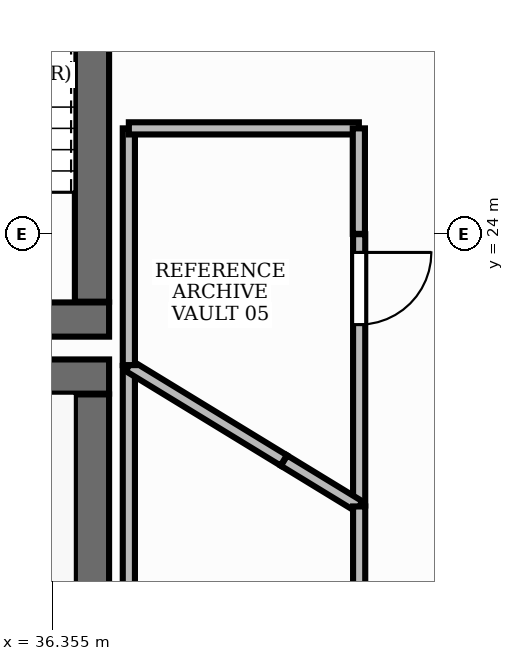
"""IFC4 building model, lengths in metres.
Left out: names, types, materials, properties, quantities, classifications, styles, units other than length and angle.
Written with IfcOpenShell. Run it as: python <this file> out.ifc"""

import sys

from ifc_helpers import new_model, si_unit, direction, frame, frame_2d, origin, place, context, subcontext, project, spatial, rectangle, extrude, element, fill, save


model = new_model("IFC4")
c1 = context("Model", 3, precision=1e-05, world=origin(), true_north=direction((0.0, 1.0)))
c2 = subcontext(c1, "Body", "Model", "MODEL_VIEW")
j1 = project(units=[si_unit("LENGTHUNIT", "METRE"), si_unit("PLANEANGLEUNIT", "RADIAN")], contexts=[c1])
p1 = place(None, origin())
s1 = spatial("IfcSite", under=j1, at=p1, CompositionType="ELEMENT")
p2 = place(p1, origin())
s2 = spatial("IfcBuilding", under=s1, at=p2, CompositionType="ELEMENT")
p3 = place(p2, frame((0.0, 0.0, 94.2)))
s3 = spatial("IfcBuildingStorey", under=s2, at=p3, CompositionType="ELEMENT", Elevation=94.2)
p4 = place(p3, frame((28.35, 22.125, 0.0), z_axis=(0.0, 0.0, 1.0), x_axis=(1.0, 0.0, 0.0)))
e1 = element("IfcWall", 1, at=p4, inside=s3, PredefinedType="SHEAR", context=c2, shape_type="SweptSolid", body=[
    extrude(rectangle(XDim=8.75, YDim=0.45, at=frame_2d((4.375, 0.0))), origin(), (0.0, 0.0, 1.0), 3.9),
])
p5 = place(p3, frame((36.875, 18.81, 0.0), z_axis=(0.0, 0.0, 1.0), x_axis=(0.0, 1.0, 0.0)))
e2 = element("IfcWall", 2, at=p5, inside=s3, PredefinedType="SHEAR", context=c2, shape_type="SweptSolid", body=[
    extrude(rectangle(XDim=3.08, YDim=0.45, at=frame_2d((1.54, 0.0))), origin(), (0.0, 0.0, 1.0), 3.9),
])
p6 = place(p3, frame((33.1, 22.875, 0.0), z_axis=(0.0, 0.0, 1.0), x_axis=(1.0, 0.0, 0.0)))
e3 = element("IfcWall", 3, at=p6, inside=s3, PredefinedType="SHEAR", context=c2, shape_type="SweptSolid", body=[
    extrude(rectangle(XDim=4.0, YDim=0.45, at=frame_2d((2.0, 0.0))), origin(), (0.0, 0.0, 1.0), 3.9),
])
p7 = place(p3, frame((36.875, 23.11, 0.0), z_axis=(0.0, 0.0, 1.0), x_axis=(0.0, 1.0, 0.0)))
e4 = element("IfcWall", 4, at=p7, inside=s3, PredefinedType="SHEAR", context=c2, shape_type="SweptSolid", body=[
    extrude(rectangle(XDim=7.78, YDim=0.45, at=frame_2d((3.89, 0.0))), origin(), (0.0, 0.0, 1.0), 3.9),
])
p8 = place(p3, frame((40.39, 23.998, 0.0), z_axis=(0.0, 0.0, 1.0), x_axis=(0.0, -1.0, 0.0)))
e5 = element("IfcWall", 5, at=p8, inside=s3, PredefinedType="PARTITIONING", context=c2, shape_type="SweptSolid", body=[
    extrude(rectangle(XDim=3.57, YDim=0.16, at=frame_2d((1.785, 0.0))), origin(), (0.0, 0.0, 1.0), 2.91),
])
p9 = place(p8, frame((0.24, 0.0, 0.0)))
e6 = element("IfcOpeningElement", 6, at=p9, cuts=e5, PredefinedType="OPENING", context=c2, shape_type="SweptSolid", body=[
    extrude(rectangle(XDim=0.95, YDim=2.15, at=frame_2d((0.475, 1.075))), frame((0.0, 0.095, 0.0), z_axis=(0.0, -1.0, 0.0), x_axis=(1.0, 0.0, 0.0)), (0.0, 0.0, 1.0), 0.19),
])
p10 = place(p3, frame((39.402, 21.019, 0.0), z_axis=(0.0, 0.0, 1.0), x_axis=(0.853521615148, -0.52105743683, 0.0)))
e7 = element("IfcWall", 7, at=p10, inside=s3, PredefinedType="PARTITIONING", context=c2, shape_type="SweptSolid", body=[
    extrude(rectangle(XDim=1.157, YDim=0.16, at=frame_2d((0.579, 0.0))), origin(), (0.0, 0.0, 1.0), 2.91),
])
p11 = place(p3, frame((40.39, 20.416, 0.0), z_axis=(0.0, 0.0, 1.0), x_axis=(0.0, -1.0, 0.0)))
e8 = element("IfcWall", 8, at=p11, inside=s3, PredefinedType="PARTITIONING", context=c2, shape_type="SweptSolid", body=[
    extrude(rectangle(XDim=3.916, YDim=0.16, at=frame_2d((1.958, 0.0))), origin(), (0.0, 0.0, 1.0), 2.91),
])
p12 = place(p3, frame((37.36, 18.1, 0.0), z_axis=(0.0, 0.0, 1.0), x_axis=(0.0, 1.0, 0.0)))
e9 = element("IfcWall", 9, at=p12, inside=s3, PredefinedType="PARTITIONING", context=c2, shape_type="SweptSolid", body=[
    extrude(rectangle(XDim=4.166, YDim=0.16, at=frame_2d((2.083, 0.0))), origin(), (0.0, 0.0, 1.0), 2.91),
])
p13 = place(p3, frame((37.36, 22.266, 0.0), z_axis=(0.0, 0.0, 1.0), x_axis=(0.85352442543, -0.521052833401, 0.0)))
e10 = element("IfcWall", 10, at=p13, inside=s3, PredefinedType="PARTITIONING", context=c2, shape_type="SweptSolid", body=[
    extrude(rectangle(XDim=2.387, YDim=0.16, at=frame_2d((1.194, 0.0))), origin(), (0.0, 0.0, 1.0), 2.91),
])
p14 = place(p3, frame((37.36, 22.276, 0.0), z_axis=(0.0, 0.0, 1.0), x_axis=(0.0, 1.0, 0.0)))
e11 = element("IfcWall", 11, at=p14, inside=s3, PredefinedType="PARTITIONING", context=c2, shape_type="SweptSolid", body=[
    extrude(rectangle(XDim=3.114, YDim=0.16, at=frame_2d((1.557, 0.0))), origin(), (0.0, 0.0, 1.0), 2.91),
])
p15 = place(p3, frame((37.36, 25.39, 0.0), z_axis=(0.0, 0.0, 1.0), x_axis=(1.0, 0.0, 0.0)))
e12 = element("IfcWall", 12, at=p15, inside=s3, PredefinedType="PARTITIONING", context=c2, shape_type="SweptSolid", body=[
    extrude(rectangle(XDim=3.026, YDim=0.16, at=frame_2d((1.513, 0.0))), origin(), (0.0, 0.0, 1.0), 2.91),
])
p16 = place(p3, frame((40.386, 25.39, 0.0), z_axis=(0.0, 0.0, 1.0), x_axis=(0.0, -1.0, 0.0)))
e13 = element("IfcWall", 13, at=p16, inside=s3, PredefinedType="PARTITIONING", context=c2, shape_type="SweptSolid", body=[
    extrude(rectangle(XDim=1.388, YDim=0.16, at=frame_2d((0.694, 0.0))), origin(), (0.0, 0.0, 1.0), 2.91),
])
p17 = place(p9, origin())
e14 = element("IfcDoor", 14, at=p17, inside=s3, OperationType="SINGLE_SWING_LEFT", PredefinedType="DOOR", context=c2, shape_type="SweptSolid", body=[
    extrude(rectangle(XDim=0.95, YDim=2.15, at=frame_2d((0.475, 1.075))), frame((0.0, 0.025, 0.0), z_axis=(0.0, -1.0, 0.0), x_axis=(1.0, 0.0, 0.0)), (0.0, 0.0, 1.0), 0.05),
])
fill(e6, e14)
save(model, sys.argv[1])
